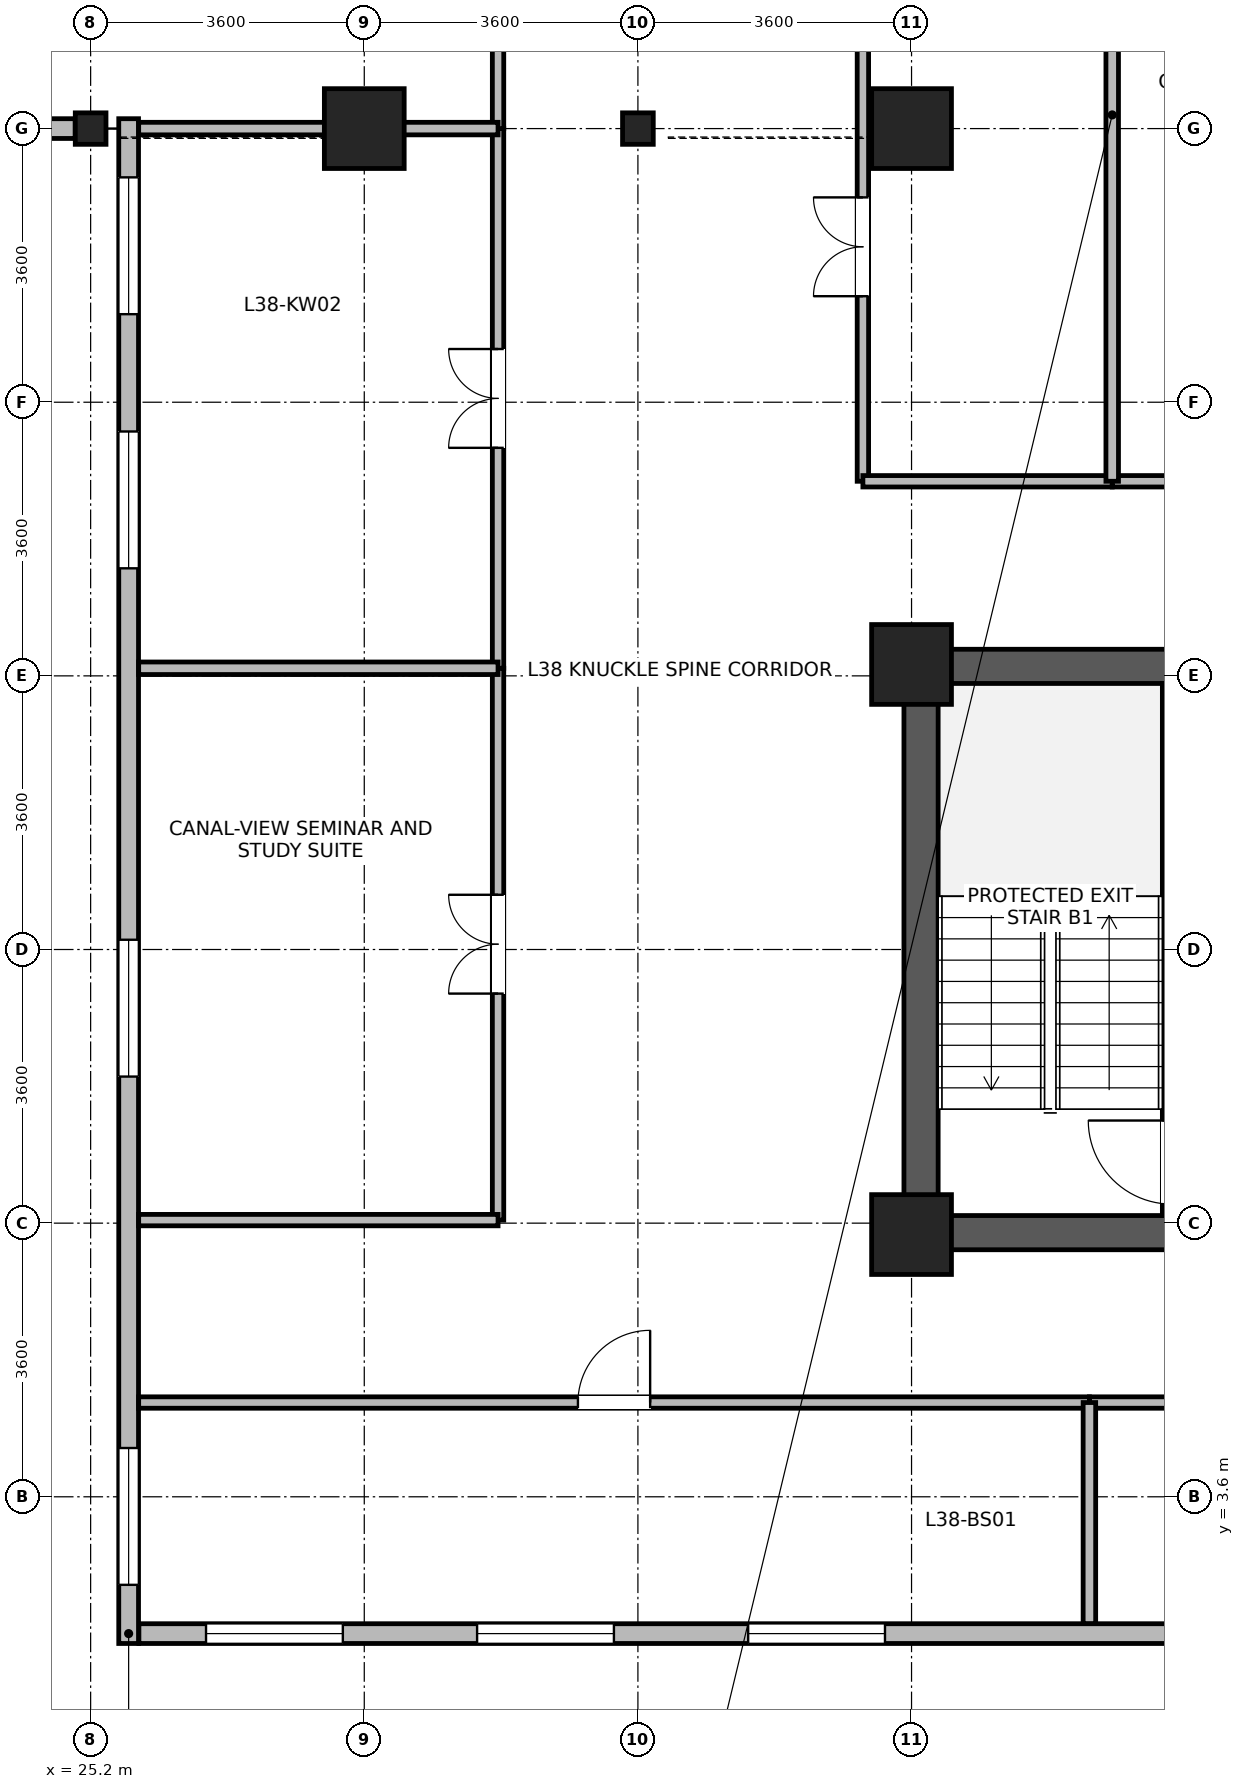
"""IFC4 building model, lengths in metres.
Left out: names, types, materials, properties, quantities, classifications, styles, units other than length and angle.
Written with IfcOpenShell. Run it as: python <this file> out.ifc"""

import sys

from ifc_helpers import new_model, si_unit, direction, frame, frame_2d, origin, origin_2d, place, context, subcontext, project, spatial, rectangle, i_section, extrude, source, transform, mapped, element, fill, save


model = new_model("IFC4")
c1 = context("Model", 3, precision=1e-05, world=origin(), true_north=direction((0.0, 1.0)))
c2 = subcontext(c1, "Body", "Model", "MODEL_VIEW")
j1 = project(units=[si_unit("LENGTHUNIT", "METRE"), si_unit("PLANEANGLEUNIT", "RADIAN")], contexts=[c1])
p1 = place(None, origin())
s1 = spatial("IfcSite", under=j1, at=p1, CompositionType="ELEMENT")
p2 = place(p1, origin())
s2 = spatial("IfcBuilding", under=s1, at=p2, CompositionType="ELEMENT")
p3 = place(p2, frame((0.0, 0.0, 151.3)))
s3 = spatial("IfcBuildingStorey", under=s2, at=p3, CompositionType="ELEMENT", Elevation=151.3)
p4 = place(p3, frame((36.125, 6.85, 0.0), z_axis=(0.0, 0.0, 1.0), x_axis=(0.0, 1.0, 0.0)))
e1 = element("IfcWall", 1, at=p4, inside=s3, PredefinedType="SHEAR", context=c2, shape_type="SweptSolid", body=[
    extrude(rectangle(XDim=7.9, YDim=0.45, at=frame_2d((3.95, 0.0))), origin(), (0.0, 0.0, 1.0), 3.46),
])
for number, where, z_axis, x_axis in (
    (2, (36.35, 7.075, 0.0), (0.0, 0.0, 1.0), (1.0, 0.0, 0.0)),
    (3, (36.35, 14.525, 0.0), (0.0, 0.0, 1.0), (1.0, 0.0, 0.0)),
):
    element("IfcWall", number, at=place(p3, frame(where, z_axis=z_axis, x_axis=x_axis)), inside=s3, PredefinedType="SHEAR", context=c2, shape_type="SweptSolid", body=[
        extrude(rectangle(XDim=3.2, YDim=0.45, at=frame_2d((1.6, 0.0))), origin(), (0.0, 0.0, 1.0), 3.46),
    ])
p5 = place(p3, frame((39.425, 7.3, 0.0), z_axis=(0.0, 0.0, 1.0), x_axis=(0.0, 1.0, 0.0)))
e4 = element("IfcWall", 4, at=p5, inside=s3, PredefinedType="SHEAR", context=c2, shape_type="SweptSolid", body=[
    extrude(rectangle(XDim=7.0, YDim=0.25, at=frame_2d((3.5, 0.0))), origin(), (0.0, 0.0, 1.0), 3.46),
])
p6 = place(p5, frame((0.15, 0.0, 0.0)))
e5 = element("IfcOpeningElement", 5, at=p6, cuts=e4, PredefinedType="OPENING", context=c2, shape_type="SweptSolid", body=[
    extrude(rectangle(XDim=1.1, YDim=2.08, at=frame_2d((0.55, 1.04))), frame((0.0, 0.135, 0.0), z_axis=(0.0, -1.0, 0.0), x_axis=(1.0, 0.0, 0.0)), (0.0, 0.0, 1.0), 0.27),
])
m1 = source(origin(), c2, "Body", "SweptSolid", [
    extrude(rectangle(XDim=1.05, YDim=1.05, at=origin_2d()), origin(), (0.0, 0.0, 1.0), 3.7),
])
for number, where, z_axis, x_axis in (
    (6, (28.8, 21.6, 0.0), (0.0, 0.0, 1.0), (1.0, 0.0, 0.0)),
    (7, (36.0, 21.6, 0.0), (0.0, 0.0, 1.0), (1.0, 0.0, 0.0)),
    (8, (36.0, 7.05, 0.0), (0.0, 0.0, 1.0), (1.0, 0.0, 0.0)),
    (9, (36.0, 14.55, 0.0), (0.0, 0.0, 1.0), (1.0, 0.0, 0.0)),
):
    element("IfcColumn", number, at=place(p3, frame(where, z_axis=z_axis, x_axis=x_axis)), inside=s3, PredefinedType="COLUMN", context=c2, shape_type="MappedRepresentation", body=[
        mapped(m1, transform((0.0, 0.0, 0.0), x_axis=(1.0, 0.0, 0.0), y_axis=(0.0, 1.0, 0.0), z_axis=(0.0, 0.0, 1.0), scale=1.0)),
    ])
m2 = source(origin(), c2, "Body", "SweptSolid", [
    extrude(i_section(OverallWidth=0.404, OverallDepth=0.414, WebThickness=0.021, FlangeThickness=0.028, FilletRadius=0.015, at=origin_2d()), origin(), (0.0, 0.0, 1.0), 3.7),
])
for number, where, z_axis, x_axis in (
    (10, (25.2, 21.6, 0.0), (0.0, 0.0, 1.0), (1.0, 0.0, 0.0)),
    (11, (32.4, 21.6, 0.0), (0.0, 0.0, 1.0), (1.0, 0.0, 0.0)),
):
    element("IfcColumn", number, at=place(p3, frame(where, z_axis=z_axis, x_axis=x_axis)), inside=s3, PredefinedType="COLUMN", context=c2, shape_type="MappedRepresentation", body=[
        mapped(m2, transform((0.0, 0.0, 0.0), x_axis=(1.0, 0.0, 0.0), y_axis=(0.0, 1.0, 0.0), z_axis=(0.0, 0.0, 1.0), scale=1.0)),
    ])
p7 = place(p3, frame((54.365, 1.8, 0.0), z_axis=(0.0, 0.0, 1.0), x_axis=(-1.0, 0.0, 0.0)))
e12 = element("IfcWall", 12, at=p7, inside=s3, PredefinedType="STANDARD", context=c2, shape_type="SweptSolid", body=[
    extrude(rectangle(XDim=28.53, YDim=0.26, at=frame_2d((14.265, 0.0))), origin(), (0.0, 0.0, 1.0), 3.44),
])
p8 = place(p7, frame((4.449, 0.0, 0.85)))
e13 = element("IfcOpeningElement", 13, at=p8, cuts=e12, PredefinedType="OPENING", context=c2, shape_type="SweptSolid", body=[
    extrude(rectangle(XDim=1.8, YDim=1.85, at=frame_2d((0.9, 0.925))), frame((0.0, 0.14, 0.0), z_axis=(0.0, -1.0, 0.0), x_axis=(1.0, 0.0, 0.0)), (0.0, 0.0, 1.0), 0.28),
])
p9 = place(p7, frame((8.016, 0.0, 0.85)))
e14 = element("IfcOpeningElement", 14, at=p9, cuts=e12, PredefinedType="OPENING", context=c2, shape_type="SweptSolid", body=[
    extrude(rectangle(XDim=1.8, YDim=1.85, at=frame_2d((0.9, 0.925))), frame((0.0, 0.14, 0.0), z_axis=(0.0, -1.0, 0.0), x_axis=(1.0, 0.0, 0.0)), (0.0, 0.0, 1.0), 0.28),
])
p10 = place(p7, frame((11.582, 0.0, 0.85)))
e15 = element("IfcOpeningElement", 15, at=p10, cuts=e12, PredefinedType="OPENING", context=c2, shape_type="SweptSolid", body=[
    extrude(rectangle(XDim=1.8, YDim=1.85, at=frame_2d((0.9, 0.925))), frame((0.0, 0.14, 0.0), z_axis=(0.0, -1.0, 0.0), x_axis=(1.0, 0.0, 0.0)), (0.0, 0.0, 1.0), 0.28),
])
p11 = place(p7, frame((18.714, 0.0, 0.85)))
e16 = element("IfcOpeningElement", 16, at=p11, cuts=e12, PredefinedType="OPENING", context=c2, shape_type="SweptSolid", body=[
    extrude(rectangle(XDim=1.8, YDim=1.85, at=frame_2d((0.9, 0.925))), frame((0.0, 0.14, 0.0), z_axis=(0.0, -1.0, 0.0), x_axis=(1.0, 0.0, 0.0)), (0.0, 0.0, 1.0), 0.28),
])
p12 = place(p7, frame((22.281, 0.0, 0.85)))
e17 = element("IfcOpeningElement", 17, at=p12, cuts=e12, PredefinedType="OPENING", context=c2, shape_type="SweptSolid", body=[
    extrude(rectangle(XDim=1.8, YDim=1.85, at=frame_2d((0.9, 0.925))), frame((0.0, 0.14, 0.0), z_axis=(0.0, -1.0, 0.0), x_axis=(1.0, 0.0, 0.0)), (0.0, 0.0, 1.0), 0.28),
])
p13 = place(p7, frame((25.847, 0.0, 0.85)))
e18 = element("IfcOpeningElement", 18, at=p13, cuts=e12, PredefinedType="OPENING", context=c2, shape_type="SweptSolid", body=[
    extrude(rectangle(XDim=1.8, YDim=1.85, at=frame_2d((0.9, 0.925))), frame((0.0, 0.14, 0.0), z_axis=(0.0, -1.0, 0.0), x_axis=(1.0, 0.0, 0.0)), (0.0, 0.0, 1.0), 0.28),
])
p14 = place(p3, frame((24.997, 21.6, 0.0), z_axis=(0.0, 0.0, 1.0), x_axis=(-1.0, 0.0, 0.0)))
e19 = element("IfcWall", 19, at=p14, inside=s3, PredefinedType="STANDARD", context=c2, shape_type="SweptSolid", body=[
    extrude(rectangle(XDim=2.871, YDim=0.26, at=frame_2d((1.436, 0.0))), origin(), (0.0, 0.0, 1.0), 2.99),
])
p15 = place(p14, frame((0.96, 0.0, 0.85)))
e20 = element("IfcOpeningElement", 20, at=p15, cuts=e19, PredefinedType="OPENING", context=c2, shape_type="SweptSolid", body=[
    extrude(rectangle(XDim=0.95, YDim=1.75, at=frame_2d((0.475, 0.875))), frame((0.0, 0.14, 0.0), z_axis=(0.0, -1.0, 0.0), x_axis=(1.0, 0.0, 0.0)), (0.0, 0.0, 1.0), 0.28),
])
p16 = place(p3, frame((25.7, 1.67, 0.0), z_axis=(0.0, 0.0, 1.0), x_axis=(0.0, 1.0, 0.0)))
e21 = element("IfcWall", 21, at=p16, inside=s3, PredefinedType="STANDARD", context=c2, shape_type="SweptSolid", body=[
    extrude(rectangle(XDim=20.06, YDim=0.26, at=frame_2d((10.03, 0.0))), origin(), (0.0, 0.0, 1.0), 3.44),
])
p17 = place(p16, frame((0.772, 0.0, 0.85)))
e22 = element("IfcOpeningElement", 22, at=p17, cuts=e21, PredefinedType="OPENING", context=c2, shape_type="SweptSolid", body=[
    extrude(rectangle(XDim=1.8, YDim=1.85, at=frame_2d((0.9, 0.925))), frame((0.0, 0.14, 0.0), z_axis=(0.0, -1.0, 0.0), x_axis=(1.0, 0.0, 0.0)), (0.0, 0.0, 1.0), 0.28),
])
p18 = place(p16, frame((7.458, 0.0, 0.85)))
e23 = element("IfcOpeningElement", 23, at=p18, cuts=e21, PredefinedType="OPENING", context=c2, shape_type="SweptSolid", body=[
    extrude(rectangle(XDim=1.8, YDim=1.85, at=frame_2d((0.9, 0.925))), frame((0.0, 0.14, 0.0), z_axis=(0.0, -1.0, 0.0), x_axis=(1.0, 0.0, 0.0)), (0.0, 0.0, 1.0), 0.28),
])
p19 = place(p16, frame((14.145, 0.0, 0.85)))
e24 = element("IfcOpeningElement", 24, at=p19, cuts=e21, PredefinedType="OPENING", context=c2, shape_type="SweptSolid", body=[
    extrude(rectangle(XDim=1.8, YDim=1.85, at=frame_2d((0.9, 0.925))), frame((0.0, 0.14, 0.0), z_axis=(0.0, -1.0, 0.0), x_axis=(1.0, 0.0, 0.0)), (0.0, 0.0, 1.0), 0.28),
])
p20 = place(p16, frame((17.488, 0.0, 0.85)))
e25 = element("IfcOpeningElement", 25, at=p20, cuts=e21, PredefinedType="OPENING", context=c2, shape_type="SweptSolid", body=[
    extrude(rectangle(XDim=1.8, YDim=1.85, at=frame_2d((0.9, 0.925))), frame((0.0, 0.14, 0.0), z_axis=(0.0, -1.0, 0.0), x_axis=(1.0, 0.0, 0.0)), (0.0, 0.0, 1.0), 0.28),
])
p21 = place(p3, frame((38.34, 4.84, 0.0), z_axis=(0.0, 0.0, 1.0), x_axis=(1.0, 0.0, 0.0)))
e26 = element("IfcWall", 26, at=p21, inside=s3, PredefinedType="PARTITIONING", context=c2, shape_type="SweptSolid", body=[
    extrude(rectangle(XDim=13.62, YDim=0.15, at=frame_2d((6.81, 0.0))), origin(), (0.0, 0.0, 1.0), 3.44),
])
p22 = place(p21, frame((6.335, 0.0, 0.0)))
e27 = element("IfcOpeningElement", 27, at=p22, cuts=e26, PredefinedType="OPENING", context=c2, shape_type="SweptSolid", body=[
    extrude(rectangle(XDim=0.95, YDim=2.1, at=frame_2d((0.475, 1.05))), frame((0.0, 0.085, 0.0), z_axis=(0.0, -1.0, 0.0), x_axis=(1.0, 0.0, 0.0)), (0.0, 0.0, 1.0), 0.17),
])
p23 = place(p3, frame((25.832, 4.84, 0.0), z_axis=(0.0, 0.0, 1.0), x_axis=(1.0, 0.0, 0.0)))
e28 = element("IfcWall", 28, at=p23, inside=s3, PredefinedType="PARTITIONING", context=c2, shape_type="SweptSolid", body=[
    extrude(rectangle(XDim=12.508, YDim=0.15, at=frame_2d((6.254, 0.0))), origin(), (0.0, 0.0, 1.0), 3.44),
])
p24 = place(p23, frame((5.779, 0.0, 0.0)))
e29 = element("IfcOpeningElement", 29, at=p24, cuts=e28, PredefinedType="OPENING", context=c2, shape_type="SweptSolid", body=[
    extrude(rectangle(XDim=0.95, YDim=2.1, at=frame_2d((0.475, 1.05))), frame((0.0, 0.085, 0.0), z_axis=(0.0, -1.0, 0.0), x_axis=(1.0, 0.0, 0.0)), (0.0, 0.0, 1.0), 0.17),
])
p25 = place(p3, frame((35.36, 16.96, 0.0), z_axis=(0.0, 0.0, 1.0), x_axis=(0.0, 1.0, 0.0)))
e30 = element("IfcWall", 30, at=p25, inside=s3, PredefinedType="PARTITIONING", context=c2, shape_type="SweptSolid", body=[
    extrude(rectangle(XDim=9.64, YDim=0.15, at=frame_2d((4.82, 0.0))), origin(), (0.0, 0.0, 1.0), 3.44),
])
p26 = place(p25, frame((2.435, 0.0, 0.0)))
e31 = element("IfcOpeningElement", 31, at=p26, cuts=e30, PredefinedType="OPENING", context=c2, shape_type="SweptSolid", body=[
    extrude(rectangle(XDim=1.3, YDim=2.12, at=frame_2d((0.65, 1.06))), frame((0.0, 0.085, 0.0), z_axis=(0.0, -1.0, 0.0), x_axis=(1.0, 0.0, 0.0)), (0.0, 0.0, 1.0), 0.17),
])
p27 = place(p3, frame((30.56, 7.24, 0.0), z_axis=(0.0, 0.0, 1.0), x_axis=(0.0, 1.0, 0.0)))
e32 = element("IfcWall", 32, at=p27, inside=s3, PredefinedType="PARTITIONING", context=c2, shape_type="SweptSolid", body=[
    extrude(rectangle(XDim=7.26, YDim=0.15, at=frame_2d((3.63, 0.0))), origin(), (0.0, 0.0, 1.0), 3.44),
])
p28 = place(p27, frame((2.98, 0.0, 0.0)))
e33 = element("IfcOpeningElement", 33, at=p28, cuts=e32, PredefinedType="OPENING", context=c2, shape_type="SweptSolid", body=[
    extrude(rectangle(XDim=1.3, YDim=2.12, at=frame_2d((0.65, 1.06))), frame((0.0, 0.085, 0.0), z_axis=(0.0, -1.0, 0.0), x_axis=(1.0, 0.0, 0.0)), (0.0, 0.0, 1.0), 0.17),
])
p29 = place(p3, frame((30.56, 14.5, 0.0), z_axis=(0.0, 0.0, 1.0), x_axis=(0.0, 1.0, 0.0)))
e34 = element("IfcWall", 34, at=p29, inside=s3, PredefinedType="PARTITIONING", context=c2, shape_type="SweptSolid", body=[
    extrude(rectangle(XDim=7.1, YDim=0.15, at=frame_2d((3.55, 0.0))), origin(), (0.0, 0.0, 1.0), 3.44),
])
p30 = place(p29, frame((2.9, 0.0, 0.0)))
e35 = element("IfcOpeningElement", 35, at=p30, cuts=e34, PredefinedType="OPENING", context=c2, shape_type="SweptSolid", body=[
    extrude(rectangle(XDim=1.3, YDim=2.12, at=frame_2d((0.65, 1.06))), frame((0.0, 0.085, 0.0), z_axis=(0.0, -1.0, 0.0), x_axis=(1.0, 0.0, 0.0)), (0.0, 0.0, 1.0), 0.17),
])
p31 = place(p3, frame((30.56, 21.6, 0.0), z_axis=(0.0, 0.0, 1.0), x_axis=(0.0, 1.0, 0.0)))
e36 = element("IfcWall", 36, at=p31, inside=s3, PredefinedType="PARTITIONING", context=c2, shape_type="SweptSolid", body=[
    extrude(rectangle(XDim=5.0, YDim=0.15, at=frame_2d((2.5, 0.0))), origin(), (0.0, 0.0, 1.0), 3.44),
])
p32 = place(p3, frame((25.832, 7.24, 0.0), z_axis=(0.0, 0.0, 1.0), x_axis=(1.0, 0.0, 0.0)))
e37 = element("IfcWall", 37, at=p32, inside=s3, PredefinedType="PARTITIONING", context=c2, shape_type="SweptSolid", body=[
    extrude(rectangle(XDim=4.728, YDim=0.15, at=frame_2d((2.364, 0.0))), origin(), (0.0, 0.0, 1.0), 3.44),
])
p33 = place(p3, frame((38.64, 16.96, 0.0), z_axis=(0.0, 0.0, 1.0), x_axis=(1.0, 0.0, 0.0)))
e38 = element("IfcWall", 38, at=p33, inside=s3, PredefinedType="PARTITIONING", context=c2, shape_type="SweptSolid", body=[
    extrude(rectangle(XDim=3.54, YDim=0.15, at=frame_2d((1.77, 0.0))), origin(), (0.0, 0.0, 1.0), 3.44),
])
p34 = place(p33, frame((1.12, 0.0, 0.0)))
e39 = element("IfcOpeningElement", 39, at=p34, cuts=e38, PredefinedType="OPENING", context=c2, shape_type="SweptSolid", body=[
    extrude(rectangle(XDim=1.3, YDim=2.12, at=frame_2d((0.65, 1.06))), frame((0.0, 0.085, 0.0), z_axis=(0.0, -1.0, 0.0), x_axis=(1.0, 0.0, 0.0)), (0.0, 0.0, 1.0), 0.17),
])
p35 = place(p3, frame((35.36, 16.96, 0.0), z_axis=(0.0, 0.0, 1.0), x_axis=(1.0, 0.0, 0.0)))
e40 = element("IfcWall", 40, at=p35, inside=s3, PredefinedType="PARTITIONING", context=c2, shape_type="SweptSolid", body=[
    extrude(rectangle(XDim=3.28, YDim=0.15, at=frame_2d((1.64, 0.0))), origin(), (0.0, 0.0, 1.0), 3.44),
])
p36 = place(p3, frame((38.64, 16.96, 0.0), z_axis=(0.0, 0.0, 1.0), x_axis=(0.0, 1.0, 0.0)))
e41 = element("IfcWall", 41, at=p36, inside=s3, PredefinedType="PARTITIONING", context=c2, shape_type="SweptSolid", body=[
    extrude(rectangle(XDim=9.64, YDim=0.165, at=frame_2d((4.82, 0.0))), origin(), (0.0, 0.0, 1.0), 3.44),
])
p37 = place(p3, frame((25.832, 14.5, 0.0), z_axis=(0.0, 0.0, 1.0), x_axis=(1.0, 0.0, 0.0)))
e42 = element("IfcWall", 42, at=p37, inside=s3, PredefinedType="PARTITIONING", context=c2, shape_type="SweptSolid", body=[
    extrude(rectangle(XDim=4.728, YDim=0.165, at=frame_2d((2.364, 0.0))), origin(), (0.0, 0.0, 1.0), 3.44),
])
p38 = place(p3, frame((25.832, 21.6, 0.0), z_axis=(0.0, 0.0, 1.0), x_axis=(1.0, 0.0, 0.0)))
e43 = element("IfcWall", 43, at=p38, inside=s3, PredefinedType="PARTITIONING", context=c2, shape_type="SweptSolid", body=[
    extrude(rectangle(XDim=4.728, YDim=0.165, at=frame_2d((2.364, 0.0))), origin(), (0.0, 0.0, 1.0), 2.99),
])
p39 = place(p3, frame((38.34, 1.932, 0.0), z_axis=(0.0, 0.0, 1.0), x_axis=(0.0, 1.0, 0.0)))
e44 = element("IfcWall", 44, at=p39, inside=s3, PredefinedType="PARTITIONING", context=c2, shape_type="SweptSolid", body=[
    extrude(rectangle(XDim=2.908, YDim=0.165, at=frame_2d((1.454, 0.0))), origin(), (0.0, 0.0, 1.0), 3.44),
])
p40 = place(p11, origin())
e45 = element("IfcWindow", 45, at=p40, inside=s3, PartitioningType="SINGLE_PANEL", PredefinedType="WINDOW", context=c2, shape_type="SweptSolid", body=[
    extrude(rectangle(XDim=1.8, YDim=1.85, at=frame_2d((0.9, 0.925))), frame((0.0, 0.03, 0.0), z_axis=(0.0, -1.0, 0.0), x_axis=(1.0, 0.0, 0.0)), (0.0, 0.0, 1.0), 0.06),
])
fill(e16, e45)
p41 = place(p12, origin())
e46 = element("IfcWindow", 46, at=p41, inside=s3, PartitioningType="SINGLE_PANEL", PredefinedType="WINDOW", context=c2, shape_type="SweptSolid", body=[
    extrude(rectangle(XDim=1.8, YDim=1.85, at=frame_2d((0.9, 0.925))), frame((0.0, 0.03, 0.0), z_axis=(0.0, -1.0, 0.0), x_axis=(1.0, 0.0, 0.0)), (0.0, 0.0, 1.0), 0.06),
])
fill(e17, e46)
p42 = place(p13, origin())
e47 = element("IfcWindow", 47, at=p42, inside=s3, PartitioningType="SINGLE_PANEL", PredefinedType="WINDOW", context=c2, shape_type="SweptSolid", body=[
    extrude(rectangle(XDim=1.8, YDim=1.85, at=frame_2d((0.9, 0.925))), frame((0.0, 0.03, 0.0), z_axis=(0.0, -1.0, 0.0), x_axis=(1.0, 0.0, 0.0)), (0.0, 0.0, 1.0), 0.06),
])
fill(e18, e47)
p43 = place(p17, origin())
e48 = element("IfcWindow", 48, at=p43, inside=s3, PartitioningType="SINGLE_PANEL", PredefinedType="WINDOW", context=c2, shape_type="SweptSolid", body=[
    extrude(rectangle(XDim=1.8, YDim=1.85, at=frame_2d((0.9, 0.925))), frame((0.0, 0.03, 0.0), z_axis=(0.0, -1.0, 0.0), x_axis=(1.0, 0.0, 0.0)), (0.0, 0.0, 1.0), 0.06),
])
fill(e22, e48)
p44 = place(p18, origin())
e49 = element("IfcWindow", 49, at=p44, inside=s3, PartitioningType="SINGLE_PANEL", PredefinedType="WINDOW", context=c2, shape_type="SweptSolid", body=[
    extrude(rectangle(XDim=1.8, YDim=1.85, at=frame_2d((0.9, 0.925))), frame((0.0, 0.03, 0.0), z_axis=(0.0, -1.0, 0.0), x_axis=(1.0, 0.0, 0.0)), (0.0, 0.0, 1.0), 0.06),
])
fill(e23, e49)
p45 = place(p19, origin())
e50 = element("IfcWindow", 50, at=p45, inside=s3, PartitioningType="SINGLE_PANEL", PredefinedType="WINDOW", context=c2, shape_type="SweptSolid", body=[
    extrude(rectangle(XDim=1.8, YDim=1.85, at=frame_2d((0.9, 0.925))), frame((0.0, 0.03, 0.0), z_axis=(0.0, -1.0, 0.0), x_axis=(1.0, 0.0, 0.0)), (0.0, 0.0, 1.0), 0.06),
])
fill(e24, e50)
p46 = place(p20, origin())
e51 = element("IfcWindow", 51, at=p46, inside=s3, PartitioningType="SINGLE_PANEL", PredefinedType="WINDOW", context=c2, shape_type="SweptSolid", body=[
    extrude(rectangle(XDim=1.8, YDim=1.85, at=frame_2d((0.9, 0.925))), frame((0.0, 0.03, 0.0), z_axis=(0.0, -1.0, 0.0), x_axis=(1.0, 0.0, 0.0)), (0.0, 0.0, 1.0), 0.06),
])
fill(e25, e51)
p47 = place(p24, origin())
e52 = element("IfcDoor", 52, at=p47, inside=s3, OperationType="SINGLE_SWING_RIGHT", PredefinedType="DOOR", context=c2, shape_type="SweptSolid", body=[
    extrude(rectangle(XDim=0.95, YDim=2.1, at=frame_2d((0.475, 1.05))), frame((0.0, 0.025, 0.0), z_axis=(0.0, -1.0, 0.0), x_axis=(1.0, 0.0, 0.0)), (0.0, 0.0, 1.0), 0.05),
])
fill(e29, e52)
p48 = place(p26, origin())
e53 = element("IfcDoor", 53, at=p48, inside=s3, OperationType="DOUBLE_DOOR_SINGLE_SWING", PredefinedType="DOOR", context=c2, shape_type="SweptSolid", body=[
    extrude(rectangle(XDim=1.3, YDim=2.12, at=frame_2d((0.65, 1.06))), frame((0.0, 0.025, 0.0), z_axis=(0.0, -1.0, 0.0), x_axis=(1.0, 0.0, 0.0)), (0.0, 0.0, 1.0), 0.05),
])
fill(e31, e53)
p49 = place(p28, origin())
e54 = element("IfcDoor", 54, at=p49, inside=s3, OperationType="DOUBLE_DOOR_SINGLE_SWING", PredefinedType="DOOR", context=c2, shape_type="SweptSolid", body=[
    extrude(rectangle(XDim=1.3, YDim=2.12, at=frame_2d((0.65, 1.06))), frame((0.0, 0.025, 0.0), z_axis=(0.0, -1.0, 0.0), x_axis=(1.0, 0.0, 0.0)), (0.0, 0.0, 1.0), 0.05),
])
fill(e33, e54)
p50 = place(p30, origin())
e55 = element("IfcDoor", 55, at=p50, inside=s3, OperationType="DOUBLE_DOOR_SINGLE_SWING", PredefinedType="DOOR", context=c2, shape_type="SweptSolid", body=[
    extrude(rectangle(XDim=1.3, YDim=2.12, at=frame_2d((0.65, 1.06))), frame((0.0, 0.025, 0.0), z_axis=(0.0, -1.0, 0.0), x_axis=(1.0, 0.0, 0.0)), (0.0, 0.0, 1.0), 0.05),
])
fill(e35, e55)
save(model, sys.argv[1])
